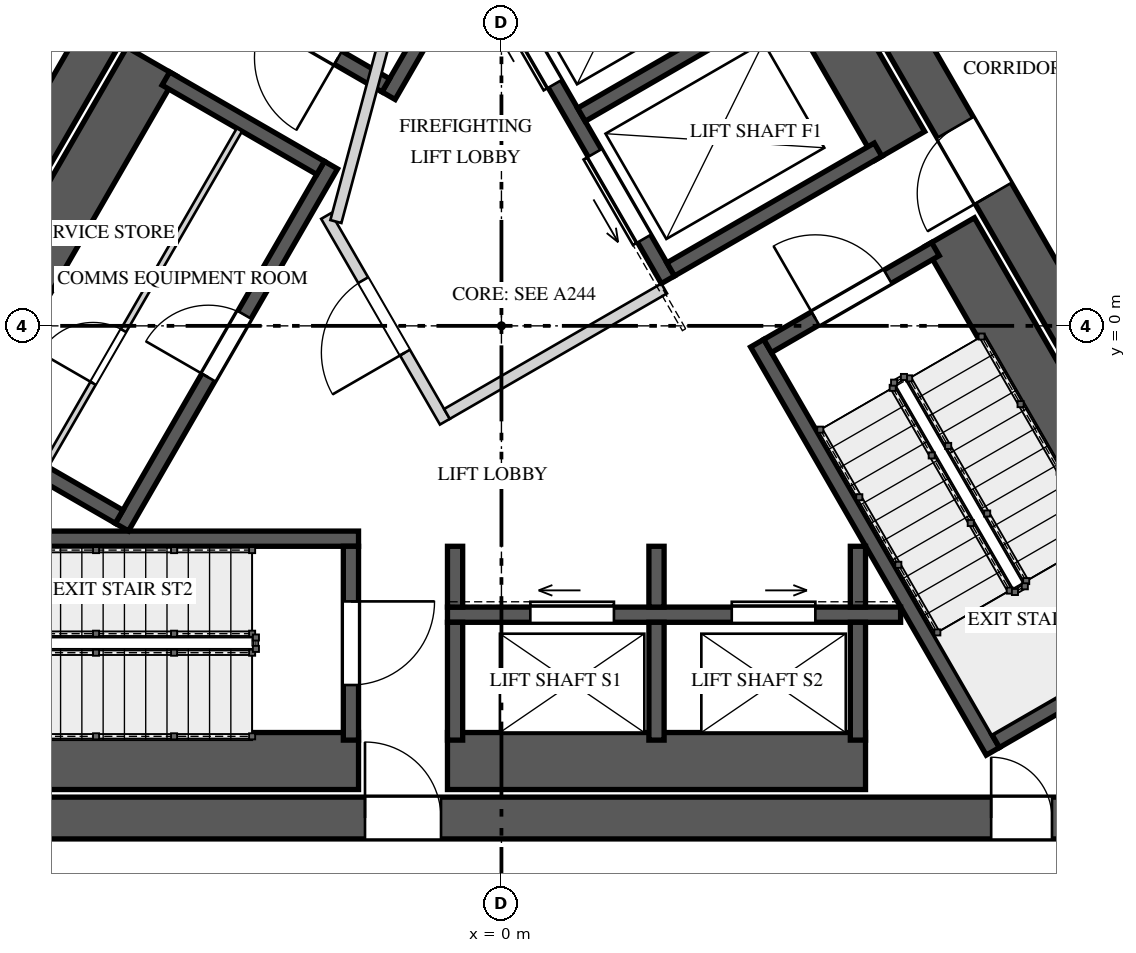
"""IFC4 building model, lengths in metres.
Left out: names, types, materials, properties, quantities, classifications, styles, units other than length and angle.
Written with IfcOpenShell. Run it as: python <this file> out.ifc"""

import sys

from ifc_helpers import new_model, si_unit, direction, frame, frame_2d, origin, place, context, subcontext, project, spatial, rectangle, extrude, element, fill, save


model = new_model("IFC4")
c1 = context("Model", 3, precision=1e-05, world=origin(), true_north=direction((0.0, 1.0)))
c2 = subcontext(c1, "Body", "Model", "MODEL_VIEW")
j1 = project(units=[si_unit("LENGTHUNIT", "METRE"), si_unit("PLANEANGLEUNIT", "RADIAN")], contexts=[c1])
p1 = place(None, origin())
s1 = spatial("IfcSite", under=j1, at=p1, CompositionType="ELEMENT")
p2 = place(p1, origin())
s2 = spatial("IfcBuilding", under=s1, at=p2, CompositionType="ELEMENT")
p3 = place(p2, frame((0.0, 0.0, 344.4)))
s3 = spatial("IfcBuildingStorey", under=s2, at=p3, CompositionType="ELEMENT", Elevation=344.4)
p4 = place(p3, frame((-1.285, 10.725, 0.0), z_axis=(0.0, 0.0, 1.0), x_axis=(-0.499994590896, -0.86602852671, 0.0)))
e1 = element("IfcWall", 1, at=p4, inside=s3, PredefinedType="SHEAR", context=c2, shape_type="SweptSolid", body=[
    extrude(rectangle(XDim=17.292, YDim=0.55, at=frame_2d((8.646, 0.0))), origin(), (0.0, 0.0, 1.0), 4.0),
])
p5 = place(p4, frame((6.851, 0.0, 0.0)))
e2 = element("IfcOpeningElement", 2, at=p5, cuts=e1, PredefinedType="OPENING", context=c2, shape_type="SweptSolid", body=[
    extrude(rectangle(XDim=1.0, YDim=2.4, at=frame_2d((0.5, 1.2))), frame((0.0, 0.285, 0.0), z_axis=(0.0, -1.0, 0.0), x_axis=(1.0, 0.0, 0.0)), (0.0, 0.0, 1.0), 0.57),
])
p6 = place(p4, frame((15.089, 0.0, 0.0)))
e3 = element("IfcOpeningElement", 3, at=p6, cuts=e1, PredefinedType="OPENING", context=c2, shape_type="SweptSolid", body=[
    extrude(rectangle(XDim=0.8, YDim=2.1, at=frame_2d((0.4, 1.05))), frame((0.0, 0.285, 0.0), z_axis=(0.0, -1.0, 0.0), x_axis=(1.0, 0.0, 0.0)), (0.0, 0.0, 1.0), 0.57),
])
p7 = place(p3, frame((-8.646, -6.475, 0.0), z_axis=(0.0, 0.0, 1.0), x_axis=(1.0, 0.0, 0.0)))
e4 = element("IfcWall", 4, at=p7, inside=s3, PredefinedType="SHEAR", context=c2, shape_type="SweptSolid", body=[
    extrude(rectangle(XDim=17.292, YDim=0.55, at=frame_2d((8.646, 0.0))), origin(), (0.0, 0.0, 1.0), 4.0),
])
p8 = place(p7, frame((6.851, 0.0, 0.0)))
e5 = element("IfcOpeningElement", 5, at=p8, cuts=e4, PredefinedType="OPENING", context=c2, shape_type="SweptSolid", body=[
    extrude(rectangle(XDim=1.0, YDim=2.4, at=frame_2d((0.5, 1.2))), frame((0.0, 0.285, 0.0), z_axis=(0.0, -1.0, 0.0), x_axis=(1.0, 0.0, 0.0)), (0.0, 0.0, 1.0), 0.57),
])
p9 = place(p7, frame((15.089, 0.0, 0.0)))
e6 = element("IfcOpeningElement", 6, at=p9, cuts=e4, PredefinedType="OPENING", context=c2, shape_type="SweptSolid", body=[
    extrude(rectangle(XDim=0.8, YDim=2.1, at=frame_2d((0.4, 1.05))), frame((0.0, 0.285, 0.0), z_axis=(0.0, -1.0, 0.0), x_axis=(1.0, 0.0, 0.0)), (0.0, 0.0, 1.0), 0.57),
])
p10 = place(p3, frame((9.93, -4.25, 0.0), z_axis=(0.0, 0.0, 1.0), x_axis=(-0.499994590896, 0.86602852671, 0.0)))
e7 = element("IfcWall", 7, at=p10, inside=s3, PredefinedType="SHEAR", context=c2, shape_type="SweptSolid", body=[
    extrude(rectangle(XDim=17.292, YDim=0.55, at=frame_2d((8.646, 0.0))), origin(), (0.0, 0.0, 1.0), 4.0),
])
p11 = place(p10, frame((6.921, 0.0, 0.0)))
e8 = element("IfcOpeningElement", 8, at=p11, cuts=e7, PredefinedType="OPENING", context=c2, shape_type="SweptSolid", body=[
    extrude(rectangle(XDim=1.0, YDim=2.4, at=frame_2d((0.5, 1.2))), frame((0.0, 0.285, 0.0), z_axis=(0.0, -1.0, 0.0), x_axis=(1.0, 0.0, 0.0)), (0.0, 0.0, 1.0), 0.57),
])
p12 = place(p3, frame((1.615, 8.397, 0.0), z_axis=(0.0, 0.0, 1.0), x_axis=(-0.500009909098, -0.866019682689, 0.0)))
e9 = element("IfcWall", 9, at=p12, inside=s3, PredefinedType="SOLIDWALL", context=c2, shape_type="SweptSolid", body=[
    extrude(rectangle(XDim=6.2, YDim=0.2, at=frame_2d((3.1, 0.0))), origin(), (0.0, 0.0, 1.0), 3.65),
])
p13 = place(p3, frame((-1.521, 3.165, 0.0), z_axis=(0.0, 0.0, 1.0), x_axis=(-0.866030925526, 0.499990435942, 0.0)))
e10 = element("IfcWall", 10, at=p13, inside=s3, PredefinedType="SOLIDWALL", context=c2, shape_type="SweptSolid", body=[
    extrude(rectangle(XDim=2.55, YDim=0.2, at=frame_2d((1.275, 0.0))), origin(), (0.0, 0.0, 1.0), 3.65),
])
p14 = place(p13, frame((0.725, 0.0, 0.0)))
e11 = element("IfcOpeningElement", 11, at=p14, cuts=e10, PredefinedType="OPENING", context=c2, shape_type="SweptSolid", body=[
    extrude(rectangle(XDim=1.1, YDim=2.4, at=frame_2d((0.55, 1.2))), frame((0.0, 0.11, 0.0), z_axis=(0.0, -1.0, 0.0), x_axis=(1.0, 0.0, 0.0)), (0.0, 0.0, 1.0), 0.22),
])
p15 = place(p3, frame((-8.08, -5.725, 0.0), z_axis=(0.0, 0.0, 1.0), x_axis=(1.0, 0.0, 0.0)))
e12 = element("IfcWall", 12, at=p15, inside=s3, PredefinedType="SOLIDWALL", context=c2, shape_type="SweptSolid", body=[
    extrude(rectangle(XDim=6.2, YDim=0.75, at=frame_2d((3.1, 0.0))), origin(), (0.0, 0.0, 1.0), 3.65),
])
p16 = place(p3, frame((-8.08, -2.8, 0.0), z_axis=(0.0, 0.0, 1.0), x_axis=(1.0, 0.0, 0.0)))
e13 = element("IfcWall", 13, at=p16, inside=s3, PredefinedType="SOLIDWALL", context=c2, shape_type="SweptSolid", body=[
    extrude(rectangle(XDim=6.2, YDim=0.2, at=frame_2d((3.1, 0.0))), origin(), (0.0, 0.0, 1.0), 3.65),
])
p17 = place(p3, frame((-1.98, -2.9, 0.0), z_axis=(0.0, 0.0, 1.0), x_axis=(0.0, -1.0, 0.0)))
e14 = element("IfcWall", 14, at=p17, inside=s3, PredefinedType="SOLIDWALL", context=c2, shape_type="SweptSolid", body=[
    extrude(rectangle(XDim=2.55, YDim=0.2, at=frame_2d((1.275, 0.0))), origin(), (0.0, 0.0, 1.0), 3.65),
])
p18 = place(p17, frame((0.725, 0.0, 0.0)))
e15 = element("IfcOpeningElement", 15, at=p18, cuts=e14, PredefinedType="OPENING", context=c2, shape_type="SweptSolid", body=[
    extrude(rectangle(XDim=1.1, YDim=2.4, at=frame_2d((0.55, 1.2))), frame((0.0, 0.11, 0.0), z_axis=(0.0, -1.0, 0.0), x_axis=(1.0, 0.0, 0.0)), (0.0, 0.0, 1.0), 0.22),
])
p19 = place(p3, frame((8.998, -4.135, 0.0), z_axis=(0.0, 0.0, 1.0), x_axis=(-0.500009909098, 0.866019682689, 0.0)))
e16 = element("IfcWall", 16, at=p19, inside=s3, PredefinedType="SOLIDWALL", context=c2, shape_type="SweptSolid", body=[
    extrude(rectangle(XDim=6.2, YDim=0.75, at=frame_2d((3.1, 0.0))), origin(), (0.0, 0.0, 1.0), 3.65),
])
p20 = place(p3, frame((6.465, -5.597, 0.0), z_axis=(0.0, 0.0, 1.0), x_axis=(-0.49998037582, 0.866036733513, 0.0)))
e17 = element("IfcWall", 17, at=p20, inside=s3, PredefinedType="SOLIDWALL", context=c2, shape_type="SweptSolid", body=[
    extrude(rectangle(XDim=6.2, YDim=0.2, at=frame_2d((3.1, 0.0))), origin(), (0.0, 0.0, 1.0), 3.65),
])
p21 = place(p3, frame((6.501, -5.461, 0.0), z_axis=(0.0, 0.0, 1.0), x_axis=(0.865989465428, 0.500062241894, 0.0)))
e18 = element("IfcWall", 18, at=p21, inside=s3, PredefinedType="SOLIDWALL", context=c2, shape_type="SweptSolid", body=[
    extrude(rectangle(XDim=2.55, YDim=0.2, at=frame_2d((1.275, 0.0))), origin(), (0.0, 0.0, 1.0), 3.65),
])
p22 = place(p3, frame((3.501, -0.265, 0.0), z_axis=(0.0, 0.0, 1.0), x_axis=(0.866030925526, 0.499990435942, 0.0)))
e19 = element("IfcWall", 19, at=p22, inside=s3, PredefinedType="SOLIDWALL", context=c2, shape_type="SweptSolid", body=[
    extrude(rectangle(XDim=2.55, YDim=0.2, at=frame_2d((1.275, 0.0))), origin(), (0.0, 0.0, 1.0), 3.65),
])
p23 = place(p22, frame((0.725, 0.0, 0.0)))
e20 = element("IfcOpeningElement", 20, at=p23, cuts=e19, PredefinedType="OPENING", context=c2, shape_type="SweptSolid", body=[
    extrude(rectangle(XDim=1.1, YDim=2.4, at=frame_2d((0.55, 1.2))), frame((0.0, 0.11, 0.0), z_axis=(0.0, -1.0, 0.0), x_axis=(1.0, 0.0, 0.0)), (0.0, 0.0, 1.0), 0.22),
])
p24 = place(p3, frame((-4.993, -2.648, 0.0), z_axis=(0.0, 0.0, 1.0), x_axis=(0.499996545922, 0.866027397988, 0.0)))
e21 = element("IfcWall", 21, at=p24, inside=s3, PredefinedType="SOLIDWALL", context=c2, shape_type="SweptSolid", body=[
    extrude(rectangle(XDim=5.5, YDim=0.2, at=frame_2d((2.75, 0.0))), origin(), (0.0, 0.0, 1.0), 3.65),
])
p25 = place(p24, frame((2.275, 0.0, 0.0)))
e22 = element("IfcOpeningElement", 22, at=p25, cuts=e21, PredefinedType="OPENING", context=c2, shape_type="SweptSolid", body=[
    extrude(rectangle(XDim=0.95, YDim=2.4, at=frame_2d((0.475, 1.2))), frame((0.0, 0.11, 0.0), z_axis=(0.0, -1.0, 0.0), x_axis=(1.0, 0.0, 0.0)), (0.0, 0.0, 1.0), 0.22),
])
p26 = place(p3, frame((-4.603, 3.477, 0.0), z_axis=(0.0, 0.0, 1.0), x_axis=(-0.500015767406, -0.866016300277, 0.0)))
e23 = element("IfcWall", 23, at=p26, inside=s3, PredefinedType="SOLIDWALL", context=c2, shape_type="SweptSolid", body=[
    extrude(rectangle(XDim=5.5, YDim=0.75, at=frame_2d((2.75, 0.0))), origin(), (0.0, 0.0, 1.0), 3.65),
])
p27 = place(p3, frame((-2.38, 2.078, 0.0), z_axis=(0.0, 0.0, 1.0), x_axis=(-0.866061024631, 0.499938297808, 0.0)))
e24 = element("IfcWall", 24, at=p27, inside=s3, PredefinedType="SOLIDWALL", context=c2, shape_type="SweptSolid", body=[
    extrude(rectangle(XDim=2.35, YDim=0.2, at=frame_2d((1.175, 0.0))), origin(), (0.0, 0.0, 1.0), 3.65),
])
p28 = place(p3, frame((-5.03, -2.512, 0.0), z_axis=(0.0, 0.0, 1.0), x_axis=(-0.866016039709, 0.500016218704, 0.0)))
e25 = element("IfcWall", 25, at=p28, inside=s3, PredefinedType="SOLIDWALL", context=c2, shape_type="SweptSolid", body=[
    extrude(rectangle(XDim=2.35, YDim=0.2, at=frame_2d((1.175, 0.0))), origin(), (0.0, 0.0, 1.0), 3.65),
])
p29 = place(p3, frame((-5.997, -1.838, 0.0), z_axis=(0.0, 0.0, 1.0), x_axis=(0.500005610874, 0.86602216432, 0.0)))
e26 = element("IfcWall", 26, at=p29, inside=s3, PredefinedType="PARTITIONING", context=c2, shape_type="SweptSolid", body=[
    extrude(rectangle(XDim=5.1, YDim=0.08, at=frame_2d((2.55, 0.0))), origin(), (0.0, 0.0, 1.0), 3.65),
])
p30 = place(p29, frame((1.25, 0.0, 0.0)))
e27 = element("IfcOpeningElement", 27, at=p30, cuts=e26, PredefinedType="OPENING", context=c2, shape_type="SweptSolid", body=[
    extrude(rectangle(XDim=0.8, YDim=2.1, at=frame_2d((0.4, 1.05))), frame((0.0, 0.05, 0.0), z_axis=(0.0, -1.0, 0.0), x_axis=(1.0, 0.0, 0.0)), (0.0, 0.0, 1.0), 0.1),
])
p31 = place(p3, frame((-0.71, -3.8, 0.0), z_axis=(0.0, 0.0, 1.0), x_axis=(1.0, 0.0, 0.0)))
e28 = element("IfcWall", 28, at=p31, inside=s3, PredefinedType="SOLIDWALL", context=c2, shape_type="SweptSolid", body=[
    extrude(rectangle(XDim=5.961, YDim=0.2, at=frame_2d((2.981, 0.0))), origin(), (0.0, 0.0, 1.0), 3.65),
])
p32 = place(p31, frame((1.09, 0.0, 0.0)))
e29 = element("IfcOpeningElement", 29, at=p32, cuts=e28, PredefinedType="OPENING", context=c2, shape_type="SweptSolid", body=[
    extrude(rectangle(XDim=1.1, YDim=2.1, at=frame_2d((0.55, 1.05))), frame((0.0, 0.11, 0.0), z_axis=(0.0, -1.0, 0.0), x_axis=(1.0, 0.0, 0.0)), (0.0, 0.0, 1.0), 0.22),
])
p33 = place(p31, frame((3.74, 0.0, 0.0)))
e30 = element("IfcOpeningElement", 30, at=p33, cuts=e28, PredefinedType="OPENING", context=c2, shape_type="SweptSolid", body=[
    extrude(rectangle(XDim=1.1, YDim=2.1, at=frame_2d((0.55, 1.05))), frame((0.0, 0.11, 0.0), z_axis=(0.0, -1.0, 0.0), x_axis=(1.0, 0.0, 0.0)), (0.0, 0.0, 1.0), 0.22),
])
p34 = place(p3, frame((-0.71, -5.725, 0.0), z_axis=(0.0, 0.0, 1.0), x_axis=(1.0, 0.0, 0.0)))
e31 = element("IfcWall", 31, at=p34, inside=s3, PredefinedType="SOLIDWALL", context=c2, shape_type="SweptSolid", body=[
    extrude(rectangle(XDim=5.5, YDim=0.75, at=frame_2d((2.75, 0.0))), origin(), (0.0, 0.0, 1.0), 3.65),
])
p35 = place(p3, frame((-0.61, -3.9, 0.0), z_axis=(0.0, 0.0, 1.0), x_axis=(0.0, -1.0, 0.0)))
e32 = element("IfcWall", 32, at=p35, inside=s3, PredefinedType="SOLIDWALL", context=c2, shape_type="SweptSolid", body=[
    extrude(rectangle(XDim=1.55, YDim=0.2, at=frame_2d((0.775, 0.0))), origin(), (0.0, 0.0, 1.0), 3.65),
])
p36 = place(p3, frame((-0.61, -2.9, 0.0), z_axis=(0.0, 0.0, 1.0), x_axis=(0.0, -1.0, 0.0)))
e33 = element("IfcWall", 33, at=p36, inside=s3, PredefinedType="SOLIDWALL", context=c2, shape_type="SweptSolid", body=[
    extrude(rectangle(XDim=0.8, YDim=0.2, at=frame_2d((0.4, 0.0))), origin(), (0.0, 0.0, 1.0), 3.65),
])
p37 = place(p3, frame((2.04, -3.9, 0.0), z_axis=(0.0, 0.0, 1.0), x_axis=(0.0, -1.0, 0.0)))
e34 = element("IfcWall", 34, at=p37, inside=s3, PredefinedType="SOLIDWALL", context=c2, shape_type="SweptSolid", body=[
    extrude(rectangle(XDim=1.55, YDim=0.2, at=frame_2d((0.775, 0.0))), origin(), (0.0, 0.0, 1.0), 3.65),
])
p38 = place(p3, frame((2.04, -2.9, 0.0), z_axis=(0.0, 0.0, 1.0), x_axis=(0.0, -1.0, 0.0)))
e35 = element("IfcWall", 35, at=p38, inside=s3, PredefinedType="SOLIDWALL", context=c2, shape_type="SweptSolid", body=[
    extrude(rectangle(XDim=0.8, YDim=0.2, at=frame_2d((0.4, 0.0))), origin(), (0.0, 0.0, 1.0), 3.65),
])
p39 = place(p3, frame((4.69, -3.9, 0.0), z_axis=(0.0, 0.0, 1.0), x_axis=(0.0, -1.0, 0.0)))
e36 = element("IfcWall", 36, at=p39, inside=s3, PredefinedType="SOLIDWALL", context=c2, shape_type="SweptSolid", body=[
    extrude(rectangle(XDim=1.55, YDim=0.2, at=frame_2d((0.775, 0.0))), origin(), (0.0, 0.0, 1.0), 3.65),
])
p40 = place(p3, frame((4.69, -2.9, 0.0), z_axis=(0.0, 0.0, 1.0), x_axis=(0.0, -1.0, 0.0)))
e37 = element("IfcWall", 37, at=p40, inside=s3, PredefinedType="SOLIDWALL", context=c2, shape_type="SweptSolid", body=[
    extrude(rectangle(XDim=0.8, YDim=0.2, at=frame_2d((0.4, 0.0))), origin(), (0.0, 0.0, 1.0), 3.65),
])
p41 = place(p3, frame((2.19, 0.606, 0.0), z_axis=(0.0, 0.0, 1.0), x_axis=(-0.500002801628, 0.866023786258, 0.0)))
e38 = element("IfcWall", 38, at=p41, inside=s3, PredefinedType="SOLIDWALL", context=c2, shape_type="SweptSolid", body=[
    extrude(rectangle(XDim=4.9, YDim=0.2, at=frame_2d((2.45, 0.0))), origin(), (0.0, 0.0, 1.0), 3.65),
])
p42 = place(p41, frame((0.625, 0.0, 0.0)))
e39 = element("IfcOpeningElement", 39, at=p42, cuts=e38, PredefinedType="OPENING", context=c2, shape_type="SweptSolid", body=[
    extrude(rectangle(XDim=1.3, YDim=2.1, at=frame_2d((0.65, 1.05))), frame((0.0, 0.11, 0.0), z_axis=(0.0, -1.0, 0.0), x_axis=(1.0, 0.0, 0.0)), (0.0, 0.0, 1.0), 0.22),
])
p43 = place(p41, frame((2.975, 0.0, 0.0)))
e40 = element("IfcOpeningElement", 40, at=p43, cuts=e38, PredefinedType="OPENING", context=c2, shape_type="SweptSolid", body=[
    extrude(rectangle(XDim=1.3, YDim=2.1, at=frame_2d((0.65, 1.05))), frame((0.0, 0.11, 0.0), z_axis=(0.0, -1.0, 0.0), x_axis=(1.0, 0.0, 0.0)), (0.0, 0.0, 1.0), 0.22),
])
p44 = place(p3, frame((5.243, 2.369, 0.0), z_axis=(0.0, 0.0, 1.0), x_axis=(-0.500002801628, 0.866023786258, 0.0)))
e41 = element("IfcWall", 41, at=p44, inside=s3, PredefinedType="SOLIDWALL", context=c2, shape_type="SweptSolid", body=[
    extrude(rectangle(XDim=4.9, YDim=0.75, at=frame_2d((2.45, 0.0))), origin(), (0.0, 0.0, 1.0), 3.65),
])
for number, where, z_axis, x_axis in (
    (42, (2.227, 0.743, 0.0), (0.0, 0.0, 1.0), (0.866, 0.5, 0.0)),
    (43, (1.052, 2.778, 0.0), (0.0, 0.0, 1.0), (0.866, 0.5, 0.0)),
):
    element("IfcWall", number, at=place(p3, frame(where, z_axis=z_axis, x_axis=x_axis)), inside=s3, PredefinedType="SOLIDWALL", context=c2, shape_type="SweptSolid", body=[
        extrude(rectangle(XDim=3.15, YDim=0.2, at=frame_2d((1.575, 0.0))), origin(), (0.0, 0.0, 1.0), 3.65),
    ])
p45 = place(p3, frame((-0.744, -1.261, 0.0), z_axis=(0.0, 0.0, 1.0), x_axis=(-0.500004234368, 0.866022959057, 0.0)))
e44 = element("IfcWall", 44, at=p45, inside=s3, PredefinedType="PARTITIONING", context=c2, shape_type="SweptSolid", body=[
    extrude(rectangle(XDim=3.125, YDim=0.15, at=frame_2d((1.562, 0.0))), origin(), (0.0, 0.0, 1.0), 3.65),
])
p46 = place(p45, frame((1.05, 0.0, 0.0)))
e45 = element("IfcOpeningElement", 45, at=p46, cuts=e44, PredefinedType="OPENING", context=c2, shape_type="SweptSolid", body=[
    extrude(rectangle(XDim=1.1, YDim=2.4, at=frame_2d((0.55, 1.2))), frame((0.0, 0.085, 0.0), z_axis=(0.0, -1.0, 0.0), x_axis=(1.0, 0.0, 0.0)), (0.0, 0.0, 1.0), 0.17),
])
p47 = place(p3, frame((-0.717, -1.159, 0.0), z_axis=(0.0, 0.0, 1.0), x_axis=(0.866008176907, 0.50002983664, 0.0)))
e46 = element("IfcWall", 46, at=p47, inside=s3, PredefinedType="PARTITIONING", context=c2, shape_type="SweptSolid", body=[
    extrude(rectangle(XDim=3.3, YDim=0.15, at=frame_2d((1.65, 0.0))), origin(), (0.0, 0.0, 1.0), 3.65),
])
p48 = place(p3, frame((-2.178, 1.372, 0.0), z_axis=(0.0, 0.0, 1.0), x_axis=(0.258808958833, 0.96592852884, 0.0)))
e47 = element("IfcWall", 47, at=p48, inside=s3, PredefinedType="PARTITIONING", context=c2, shape_type="SweptSolid", body=[
    extrude(rectangle(XDim=2.903, YDim=0.15, at=frame_2d((1.451, 0.0))), origin(), (0.0, 0.0, 1.0), 3.65),
])
p49 = place(p3, frame((7.146, 4.722, 0.0), z_axis=(0.0, 0.0, 1.0), x_axis=(0.499955681623, -0.866050989499, 0.0)))
e48 = element("IfcWall", 48, at=p49, inside=s3, PredefinedType="SOLIDWALL", context=c2, shape_type="SweptSolid", body=[
    extrude(rectangle(XDim=1.238, YDim=0.2, at=frame_2d((0.619, 0.0))), origin(), (0.0, 0.0, 1.0), 3.65),
])
p50 = place(p14, origin())
e49 = element("IfcDoor", 49, at=p50, inside=s3, OperationType="SINGLE_SWING_RIGHT", PredefinedType="DOOR", context=c2, shape_type="SweptSolid", body=[
    extrude(rectangle(XDim=1.1, YDim=2.4, at=frame_2d((0.55, 1.2))), frame((0.0, 0.025, 0.0), z_axis=(0.0, -1.0, 0.0), x_axis=(1.0, 0.0, 0.0)), (0.0, 0.0, 1.0), 0.05),
])
fill(e11, e49)
p51 = place(p18, origin())
e50 = element("IfcDoor", 50, at=p51, inside=s3, OperationType="SINGLE_SWING_LEFT", PredefinedType="DOOR", context=c2, shape_type="SweptSolid", body=[
    extrude(rectangle(XDim=1.1, YDim=2.4, at=frame_2d((0.55, 1.2))), frame((0.0, 0.025, 0.0), z_axis=(0.0, -1.0, 0.0), x_axis=(1.0, 0.0, 0.0)), (0.0, 0.0, 1.0), 0.05),
])
fill(e15, e50)
p52 = place(p23, origin())
e51 = element("IfcDoor", 51, at=p52, inside=s3, OperationType="SINGLE_SWING_RIGHT", PredefinedType="DOOR", context=c2, shape_type="SweptSolid", body=[
    extrude(rectangle(XDim=1.1, YDim=2.4, at=frame_2d((0.55, 1.2))), frame((0.0, 0.025, 0.0), z_axis=(0.0, -1.0, 0.0), x_axis=(1.0, 0.0, 0.0)), (0.0, 0.0, 1.0), 0.05),
])
fill(e20, e51)
p53 = place(p25, origin())
e52 = element("IfcDoor", 52, at=p53, inside=s3, OperationType="SINGLE_SWING_LEFT", PredefinedType="DOOR", context=c2, shape_type="SweptSolid", body=[
    extrude(rectangle(XDim=0.95, YDim=2.4, at=frame_2d((0.475, 1.2))), frame((0.0, 0.025, 0.0), z_axis=(0.0, -1.0, 0.0), x_axis=(1.0, 0.0, 0.0)), (0.0, 0.0, 1.0), 0.05),
])
fill(e22, e52)
p54 = place(p30, origin())
e53 = element("IfcDoor", 53, at=p54, inside=s3, OperationType="SINGLE_SWING_RIGHT", PredefinedType="DOOR", context=c2, shape_type="SweptSolid", body=[
    extrude(rectangle(XDim=0.8, YDim=2.1, at=frame_2d((0.4, 1.05))), frame((0.0, 0.025, 0.0), z_axis=(0.0, -1.0, 0.0), x_axis=(1.0, 0.0, 0.0)), (0.0, 0.0, 1.0), 0.05),
])
fill(e27, e53)
p55 = place(p32, origin())
e54 = element("IfcDoor", 54, at=p55, inside=s3, OperationType="SLIDING_TO_LEFT", PredefinedType="DOOR", context=c2, shape_type="SweptSolid", body=[
    extrude(rectangle(XDim=1.1, YDim=2.1, at=frame_2d((0.55, 1.05))), frame((0.0, 0.025, 0.0), z_axis=(0.0, -1.0, 0.0), x_axis=(1.0, 0.0, 0.0)), (0.0, 0.0, 1.0), 0.05),
])
fill(e29, e54)
p56 = place(p33, origin())
e55 = element("IfcDoor", 55, at=p56, inside=s3, OperationType="SLIDING_TO_RIGHT", PredefinedType="DOOR", context=c2, shape_type="SweptSolid", body=[
    extrude(rectangle(XDim=1.1, YDim=2.1, at=frame_2d((0.55, 1.05))), frame((0.0, 0.025, 0.0), z_axis=(0.0, -1.0, 0.0), x_axis=(1.0, 0.0, 0.0)), (0.0, 0.0, 1.0), 0.05),
])
fill(e30, e55)
p57 = place(p42, origin())
e56 = element("IfcDoor", 56, at=p57, inside=s3, OperationType="SLIDING_TO_LEFT", PredefinedType="DOOR", context=c2, shape_type="SweptSolid", body=[
    extrude(rectangle(XDim=1.3, YDim=2.1, at=frame_2d((0.65, 1.05))), frame((0.0, 0.025, 0.0), z_axis=(0.0, -1.0, 0.0), x_axis=(1.0, 0.0, 0.0)), (0.0, 0.0, 1.0), 0.05),
])
fill(e39, e56)
p58 = place(p43, origin())
e57 = element("IfcDoor", 57, at=p58, inside=s3, OperationType="SLIDING_TO_RIGHT", PredefinedType="DOOR", context=c2, shape_type="SweptSolid", body=[
    extrude(rectangle(XDim=1.3, YDim=2.1, at=frame_2d((0.65, 1.05))), frame((0.0, 0.025, 0.0), z_axis=(0.0, -1.0, 0.0), x_axis=(1.0, 0.0, 0.0)), (0.0, 0.0, 1.0), 0.05),
])
fill(e40, e57)
p59 = place(p46, origin())
e58 = element("IfcDoor", 58, at=p59, inside=s3, OperationType="SINGLE_SWING_LEFT", PredefinedType="DOOR", context=c2, shape_type="SweptSolid", body=[
    extrude(rectangle(XDim=1.1, YDim=2.4, at=frame_2d((0.55, 1.2))), frame((0.0, 0.025, 0.0), z_axis=(0.0, -1.0, 0.0), x_axis=(1.0, 0.0, 0.0)), (0.0, 0.0, 1.0), 0.05),
])
fill(e45, e58)
p60 = place(p8, origin())
e59 = element("IfcDoor", 59, at=p60, inside=s3, OperationType="SINGLE_SWING_LEFT", PredefinedType="DOOR", context=c2, shape_type="SweptSolid", body=[
    extrude(rectangle(XDim=1.0, YDim=2.4, at=frame_2d((0.5, 1.2))), frame((0.0, 0.025, 0.0), z_axis=(0.0, -1.0, 0.0), x_axis=(1.0, 0.0, 0.0)), (0.0, 0.0, 1.0), 0.05),
])
fill(e5, e59)
p61 = place(p11, origin())
e60 = element("IfcDoor", 60, at=p61, inside=s3, OperationType="SINGLE_SWING_RIGHT", PredefinedType="DOOR", context=c2, shape_type="SweptSolid", body=[
    extrude(rectangle(XDim=1.0, YDim=2.4, at=frame_2d((0.5, 1.2))), frame((0.0, 0.025, 0.0), z_axis=(0.0, -1.0, 0.0), x_axis=(1.0, 0.0, 0.0)), (0.0, 0.0, 1.0), 0.05),
])
fill(e8, e60)
p62 = place(p9, origin())
e61 = element("IfcDoor", 61, at=p62, inside=s3, OperationType="SINGLE_SWING_RIGHT", PredefinedType="DOOR", context=c2, shape_type="SweptSolid", body=[
    extrude(rectangle(XDim=0.8, YDim=2.1, at=frame_2d((0.4, 1.05))), frame((0.0, 0.025, 0.0), z_axis=(0.0, -1.0, 0.0), x_axis=(1.0, 0.0, 0.0)), (0.0, 0.0, 1.0), 0.05),
])
fill(e6, e61)
save(model, sys.argv[1])
